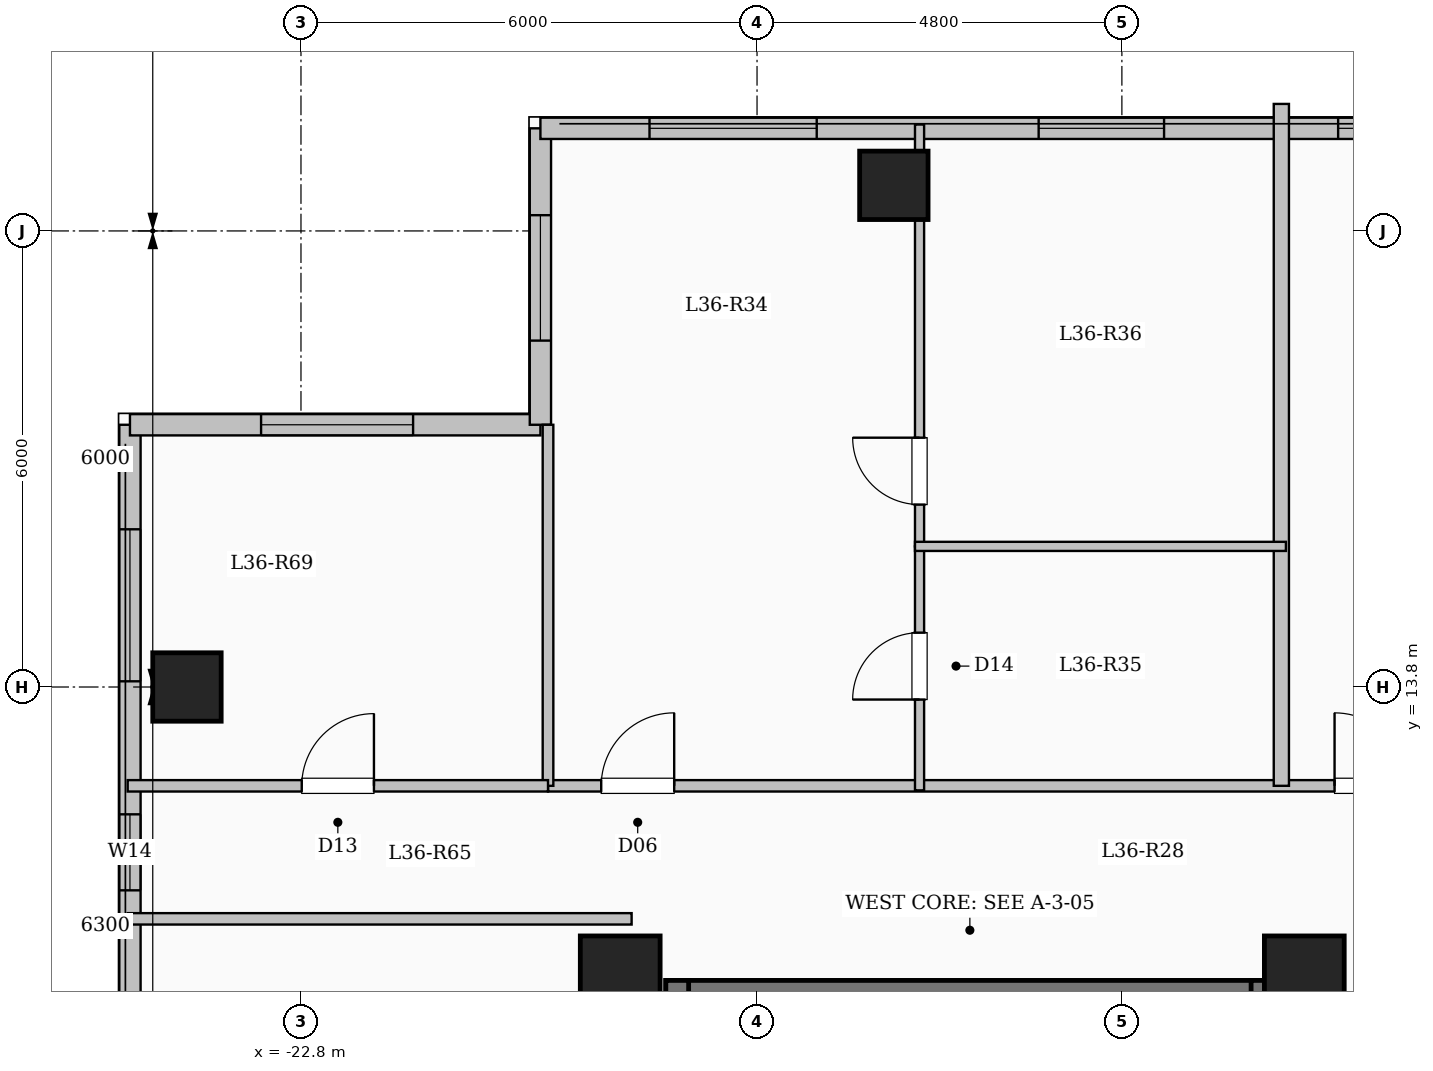
"""IFC4 building model, lengths in metres.
Left out: names, types, materials, properties, quantities, classifications, styles, units other than length and angle.
Written with IfcOpenShell. Run it as: python <this file> out.ifc"""

import sys

from ifc_helpers import new_model, si_unit, direction, frame, frame_2d, origin, origin_2d, place, context, subcontext, project, spatial, rectangle, extrude, element, fill, save


model = new_model("IFC4")
c1 = context("Model", 3, precision=1e-05, world=origin(), true_north=direction((0.0, 1.0)))
c2 = subcontext(c1, "Body", "Model", "MODEL_VIEW")
j1 = project(units=[si_unit("LENGTHUNIT", "METRE"), si_unit("PLANEANGLEUNIT", "RADIAN")], contexts=[c1])
p1 = place(None, origin())
s1 = spatial("IfcSite", under=j1, at=p1, CompositionType="ELEMENT")
p2 = place(p1, origin())
s2 = spatial("IfcBuilding", under=s1, at=p2, CompositionType="ELEMENT")
p3 = place(p2, frame((0.0, 0.0, 135.95)))
s3 = spatial("IfcBuildingStorey", under=s2, at=p3, CompositionType="ELEMENT", Elevation=135.95)
for number, where, z_axis, x_axis in (
    (1, (-9.6, 10.0, 0.0), (0.0, 0.0, 1.0), (1.0, 0.0, 0.0)),
    (2, (-18.6, 10.0, 0.0), (0.0, 0.0, 1.0), (1.0, 0.0, 0.0)),
):
    element("IfcColumn", number, at=place(p3, frame(where, z_axis=z_axis, x_axis=x_axis)), inside=s3, PredefinedType="COLUMN", context=c2, shape_type="SweptSolid", body=[
        extrude(rectangle(XDim=1.05, YDim=1.05, at=origin_2d()), origin(), (0.0, 0.0, 1.0), 3.35),
    ])
for number, where, z_axis, x_axis in (
    (3, (-15.0, 20.4, 0.0), (0.0, 0.0, 1.0), (1.0, 0.0, 0.0)),
    (4, (-24.3, 13.8, 0.0), (0.0, 0.0, 1.0), (1.0, 0.0, 0.0)),
):
    element("IfcColumn", number, at=place(p3, frame(where, z_axis=z_axis, x_axis=x_axis)), inside=s3, PredefinedType="COLUMN", context=c2, shape_type="SweptSolid", body=[
        extrude(rectangle(XDim=0.9, YDim=0.9, at=origin_2d()), origin(), (0.0, 0.0, 1.0), 3.35),
    ])
p4 = place(p3, frame((-25.05, -17.25, 0.0), z_axis=(0.0, 0.0, 1.0), x_axis=(0.0, 1.0, 0.0)))
e5 = element("IfcWall", 5, at=p4, inside=s3, PredefinedType="SOLIDWALL", context=c2, shape_type="SweptSolid", body=[
    extrude(rectangle(XDim=34.5, YDim=0.28, at=frame_2d((17.25, 0.0))), origin(), (0.0, 0.0, 1.0), 3.1),
])
p5 = place(p4, frame((2.35, 0.0, 0.9)))
e6 = element("IfcOpeningElement", 6, at=p5, cuts=e5, PredefinedType="OPENING", context=c2, shape_type="SweptSolid", body=[
    extrude(rectangle(XDim=2.2, YDim=1.75, at=frame_2d((1.1, 0.875))), frame((0.0, 0.15, 0.0), z_axis=(0.0, -1.0, 0.0), x_axis=(1.0, 0.0, 0.0)), (0.0, 0.0, 1.0), 0.3),
])
p6 = place(p4, frame((7.742, 0.0, 0.9)))
e7 = element("IfcOpeningElement", 7, at=p6, cuts=e5, PredefinedType="OPENING", context=c2, shape_type="SweptSolid", body=[
    extrude(rectangle(XDim=1.5, YDim=1.65, at=frame_2d((0.75, 0.825))), frame((0.0, 0.15, 0.0), z_axis=(0.0, -1.0, 0.0), x_axis=(1.0, 0.0, 0.0)), (0.0, 0.0, 1.0), 0.3),
])
p7 = place(p4, frame((13.25, 0.0, 0.9)))
e8 = element("IfcOpeningElement", 8, at=p7, cuts=e5, PredefinedType="OPENING", context=c2, shape_type="SweptSolid", body=[
    extrude(rectangle(XDim=2.2, YDim=1.75, at=frame_2d((1.1, 0.875))), frame((0.0, 0.15, 0.0), z_axis=(0.0, -1.0, 0.0), x_axis=(1.0, 0.0, 0.0)), (0.0, 0.0, 1.0), 0.3),
])
p8 = place(p4, frame((19.65, 0.0, 0.9)))
e9 = element("IfcOpeningElement", 9, at=p8, cuts=e5, PredefinedType="OPENING", context=c2, shape_type="SweptSolid", body=[
    extrude(rectangle(XDim=1.65, YDim=1.6, at=frame_2d((0.825, 0.8))), frame((0.0, 0.15, 0.0), z_axis=(0.0, -1.0, 0.0), x_axis=(1.0, 0.0, 0.0)), (0.0, 0.0, 1.0), 0.3),
])
p9 = place(p4, frame((24.125, 0.0, 0.9)))
e10 = element("IfcOpeningElement", 10, at=p9, cuts=e5, PredefinedType="OPENING", context=c2, shape_type="SweptSolid", body=[
    extrude(rectangle(XDim=2.0, YDim=1.7, at=frame_2d((1.0, 0.85))), frame((0.0, 0.15, 0.0), z_axis=(0.0, -1.0, 0.0), x_axis=(1.0, 0.0, 0.0)), (0.0, 0.0, 1.0), 0.3),
])
p10 = place(p4, frame((28.375, 0.0, 0.95)))
e11 = element("IfcOpeningElement", 11, at=p10, cuts=e5, PredefinedType="OPENING", context=c2, shape_type="SweptSolid", body=[
    extrude(rectangle(XDim=1.0, YDim=1.5, at=frame_2d((0.5, 0.75))), frame((0.0, 0.15, 0.0), z_axis=(0.0, -1.0, 0.0), x_axis=(1.0, 0.0, 0.0)), (0.0, 0.0, 1.0), 0.3),
])
p11 = place(p4, frame((31.125, 0.0, 0.9)))
e12 = element("IfcOpeningElement", 12, at=p11, cuts=e5, PredefinedType="OPENING", context=c2, shape_type="SweptSolid", body=[
    extrude(rectangle(XDim=2.0, YDim=1.7, at=frame_2d((1.0, 0.85))), frame((0.0, 0.15, 0.0), z_axis=(0.0, -1.0, 0.0), x_axis=(1.0, 0.0, 0.0)), (0.0, 0.0, 1.0), 0.3),
])
p12 = place(p3, frame((-25.05, 17.25, 0.0), z_axis=(0.0, 0.0, 1.0), x_axis=(1.0, 0.0, 0.0)))
e13 = element("IfcWall", 13, at=p12, inside=s3, PredefinedType="SOLIDWALL", context=c2, shape_type="SweptSolid", body=[
    extrude(rectangle(XDim=5.4, YDim=0.28, at=frame_2d((2.7, 0.0))), origin(), (0.0, 0.0, 1.0), 3.1),
])
p13 = place(p12, frame((1.725, 0.0, 0.9)))
e14 = element("IfcOpeningElement", 14, at=p13, cuts=e13, PredefinedType="OPENING", context=c2, shape_type="SweptSolid", body=[
    extrude(rectangle(XDim=2.0, YDim=1.7, at=frame_2d((1.0, 0.85))), frame((0.0, 0.15, 0.0), z_axis=(0.0, -1.0, 0.0), x_axis=(1.0, 0.0, 0.0)), (0.0, 0.0, 1.0), 0.3),
])
p14 = place(p3, frame((-19.65, 17.25, 0.0), z_axis=(0.0, 0.0, 1.0), x_axis=(0.0, 1.0, 0.0)))
e15 = element("IfcWall", 15, at=p14, inside=s3, PredefinedType="SOLIDWALL", context=c2, shape_type="SweptSolid", body=[
    extrude(rectangle(XDim=3.9, YDim=0.28, at=frame_2d((1.95, 0.0))), origin(), (0.0, 0.0, 1.0), 3.1),
])
p15 = place(p14, frame((1.107, 0.0, 0.9)))
e16 = element("IfcOpeningElement", 16, at=p15, cuts=e15, PredefinedType="OPENING", context=c2, shape_type="SweptSolid", body=[
    extrude(rectangle(XDim=1.65, YDim=1.6, at=frame_2d((0.825, 0.8))), frame((0.0, 0.15, 0.0), z_axis=(0.0, -1.0, 0.0), x_axis=(1.0, 0.0, 0.0)), (0.0, 0.0, 1.0), 0.3),
])
p16 = place(p3, frame((-19.65, 21.15, 0.0), z_axis=(0.0, 0.0, 1.0), x_axis=(1.0, 0.0, 0.0)))
e17 = element("IfcWall", 17, at=p16, inside=s3, PredefinedType="SOLIDWALL", context=c2, shape_type="SweptSolid", body=[
    extrude(rectangle(XDim=12.3, YDim=0.28, at=frame_2d((6.15, 0.0))), origin(), (0.0, 0.0, 1.0), 3.1),
])
p17 = place(p16, frame((1.435, 0.0, 0.9)))
e18 = element("IfcOpeningElement", 18, at=p17, cuts=e17, PredefinedType="OPENING", context=c2, shape_type="SweptSolid", body=[
    extrude(rectangle(XDim=2.2, YDim=1.75, at=frame_2d((1.1, 0.875))), frame((0.0, 0.15, 0.0), z_axis=(0.0, -1.0, 0.0), x_axis=(1.0, 0.0, 0.0)), (0.0, 0.0, 1.0), 0.3),
])
p18 = place(p16, frame((6.555, 0.0, 0.9)))
e19 = element("IfcOpeningElement", 19, at=p18, cuts=e17, PredefinedType="OPENING", context=c2, shape_type="SweptSolid", body=[
    extrude(rectangle(XDim=1.65, YDim=1.6, at=frame_2d((0.825, 0.8))), frame((0.0, 0.15, 0.0), z_axis=(0.0, -1.0, 0.0), x_axis=(1.0, 0.0, 0.0)), (0.0, 0.0, 1.0), 0.3),
])
p19 = place(p16, frame((10.495, 0.0, 0.95)))
e20 = element("IfcOpeningElement", 20, at=p19, cuts=e17, PredefinedType="OPENING", context=c2, shape_type="SweptSolid", body=[
    extrude(rectangle(XDim=1.2, YDim=1.5, at=frame_2d((0.6, 0.75))), frame((0.0, 0.15, 0.0), z_axis=(0.0, -1.0, 0.0), x_axis=(1.0, 0.0, 0.0)), (0.0, 0.0, 1.0), 0.3),
])
p20 = place(p3, frame((-18.0, 9.79, 0.0), z_axis=(0.0, 0.0, 1.0), x_axis=(1.0, 0.0, 0.0)))
e21 = element("IfcWall", 21, at=p20, inside=s3, PredefinedType="SHEAR", context=c2, shape_type="SweptSolid", body=[
    extrude(rectangle(XDim=8.0, YDim=0.3, at=frame_2d((4.0, 0.0))), origin(), (0.0, 0.0, 1.0), 3.35),
])
for number, where, z_axis, x_axis in (
    (22, (-17.85, 6.35, 0.0), (0.0, 0.0, 1.0), (0.0, 1.0, 0.0)),
    (23, (-10.15, 6.35, 0.0), (0.0, 0.0, 1.0), (0.0, 1.0, 0.0)),
):
    element("IfcWall", number, at=place(p3, frame(where, z_axis=z_axis, x_axis=x_axis)), inside=s3, PredefinedType="SHEAR", context=c2, shape_type="SweptSolid", body=[
        extrude(rectangle(XDim=3.59, YDim=0.3, at=frame_2d((1.795, 0.0))), origin(), (0.0, 0.0, 1.0), 3.35),
    ])
p21 = place(p3, frame((-19.55, 12.5, 0.0), z_axis=(0.0, 0.0, 1.0), x_axis=(1.0, 0.0, 0.0)))
e24 = element("IfcWall", 24, at=p21, inside=s3, PredefinedType="PARTITIONING", context=c2, shape_type="SweptSolid", body=[
    extrude(rectangle(XDim=15.7, YDim=0.15, at=frame_2d((7.85, 0.0))), origin(), (0.0, 0.0, 1.0), 3.1),
])
p22 = place(p21, frame((0.7, 0.0, 0.0)))
e25 = element("IfcOpeningElement", 25, at=p22, cuts=e24, PredefinedType="OPENING", context=c2, shape_type="SweptSolid", body=[
    extrude(rectangle(XDim=0.96, YDim=2.15, at=frame_2d((0.48, 1.075))), frame((0.0, 0.085, 0.0), z_axis=(0.0, -1.0, 0.0), x_axis=(1.0, 0.0, 0.0)), (0.0, 0.0, 1.0), 0.17),
])
p23 = place(p21, frame((10.348, 0.0, 0.0)))
e26 = element("IfcOpeningElement", 26, at=p23, cuts=e24, PredefinedType="OPENING", context=c2, shape_type="SweptSolid", body=[
    extrude(rectangle(XDim=0.96, YDim=2.15, at=frame_2d((0.48, 1.075))), frame((0.0, 0.085, 0.0), z_axis=(0.0, -1.0, 0.0), x_axis=(1.0, 0.0, 0.0)), (0.0, 0.0, 1.0), 0.17),
])
p24 = place(p3, frame((-9.902, 12.5, 0.0), z_axis=(0.0, 0.0, 1.0), x_axis=(0.0, 1.0, 0.0)))
e27 = element("IfcWall", 27, at=p24, inside=s3, PredefinedType="SOLIDWALL", context=c2, shape_type="SweptSolid", body=[
    extrude(rectangle(XDim=8.971, YDim=0.2, at=frame_2d((4.485, 0.0))), origin(), (0.0, 0.0, 1.0), 3.1),
])
p25 = place(p3, frame((-14.662, 12.44, 0.0), z_axis=(0.0, 0.0, 1.0), x_axis=(0.0, 1.0, 0.0)))
e28 = element("IfcWall", 28, at=p25, inside=s3, PredefinedType="PARTITIONING", context=c2, shape_type="SweptSolid", body=[
    extrude(rectangle(XDim=3.21, YDim=0.12, at=frame_2d((1.605, 0.0))), origin(), (0.0, 0.0, 1.0), 3.1),
])
p26 = place(p25, frame((1.195, 0.0, 0.0)))
e29 = element("IfcOpeningElement", 29, at=p26, cuts=e28, PredefinedType="OPENING", context=c2, shape_type="SweptSolid", body=[
    extrude(rectangle(XDim=0.88, YDim=2.1, at=frame_2d((0.44, 1.05))), frame((0.0, 0.07, 0.0), z_axis=(0.0, -1.0, 0.0), x_axis=(1.0, 0.0, 0.0)), (0.0, 0.0, 1.0), 0.14),
])
p27 = place(p3, frame((-14.662, 15.65, 0.0), z_axis=(0.0, 0.0, 1.0), x_axis=(0.0, 1.0, 0.0)))
e30 = element("IfcWall", 30, at=p27, inside=s3, PredefinedType="PARTITIONING", context=c2, shape_type="SweptSolid", body=[
    extrude(rectangle(XDim=5.55, YDim=0.12, at=frame_2d((2.775, 0.0))), origin(), (0.0, 0.0, 1.0), 3.1),
])
p28 = place(p27, frame((0.55, 0.0, 0.0)))
e31 = element("IfcOpeningElement", 31, at=p28, cuts=e30, PredefinedType="OPENING", context=c2, shape_type="SweptSolid", body=[
    extrude(rectangle(XDim=0.88, YDim=2.1, at=frame_2d((0.44, 1.05))), frame((0.0, 0.07, 0.0), z_axis=(0.0, -1.0, 0.0), x_axis=(1.0, 0.0, 0.0)), (0.0, 0.0, 1.0), 0.14),
])
p29 = place(p3, frame((-14.722, 15.65, 0.0), z_axis=(0.0, 0.0, 1.0), x_axis=(1.0, 0.0, 0.0)))
e32 = element("IfcWall", 32, at=p29, inside=s3, PredefinedType="PARTITIONING", context=c2, shape_type="SweptSolid", body=[
    extrude(rectangle(XDim=4.88, YDim=0.12, at=frame_2d((2.44, 0.0))), origin(), (0.0, 0.0, 1.0), 2.685),
])
p30 = place(p3, frame((-25.08, 10.75, 0.0), z_axis=(0.0, 0.0, 1.0), x_axis=(1.0, 0.0, 0.0)))
e33 = element("IfcWall", 33, at=p30, inside=s3, PredefinedType="PARTITIONING", context=c2, shape_type="SweptSolid", body=[
    extrude(rectangle(XDim=6.63, YDim=0.15, at=frame_2d((3.315, 0.0))), origin(), (0.0, 0.0, 1.0), 3.1),
])
p31 = place(p3, frame((-19.55, 12.5, 0.0), z_axis=(0.0, 0.0, 1.0), x_axis=(0.0, 1.0, 0.0)))
e34 = element("IfcWall", 34, at=p31, inside=s3, PredefinedType="PARTITIONING", context=c2, shape_type="SweptSolid", body=[
    extrude(rectangle(XDim=4.75, YDim=0.14, at=frame_2d((2.375, 0.0))), origin(), (0.0, 0.0, 1.0), 3.1),
])
p32 = place(p3, frame((-25.08, 12.5, 0.0), z_axis=(0.0, 0.0, 1.0), x_axis=(1.0, 0.0, 0.0)))
e35 = element("IfcWall", 35, at=p32, inside=s3, PredefinedType="PARTITIONING", context=c2, shape_type="SweptSolid", body=[
    extrude(rectangle(XDim=5.53, YDim=0.15, at=frame_2d((2.765, 0.0))), origin(), (0.0, 0.0, 1.0), 3.1),
])
p33 = place(p32, frame((2.29, 0.0, 0.0)))
e36 = element("IfcOpeningElement", 36, at=p33, cuts=e35, PredefinedType="OPENING", context=c2, shape_type="SweptSolid", body=[
    extrude(rectangle(XDim=0.95, YDim=2.15, at=frame_2d((0.475, 1.075))), frame((0.0, 0.085, 0.0), z_axis=(0.0, -1.0, 0.0), x_axis=(1.0, 0.0, 0.0)), (0.0, 0.0, 1.0), 0.17),
])
p34 = place(p10, origin())
e37 = element("IfcWindow", 37, at=p34, inside=s3, PartitioningType="SINGLE_PANEL", PredefinedType="WINDOW", context=c2, shape_type="SweptSolid", body=[
    extrude(rectangle(XDim=1.0, YDim=1.5, at=frame_2d((0.5, 0.75))), frame((0.0, 0.03, 0.0), z_axis=(0.0, -1.0, 0.0), x_axis=(1.0, 0.0, 0.0)), (0.0, 0.0, 1.0), 0.06),
])
fill(e11, e37)
p35 = place(p11, origin())
e38 = element("IfcWindow", 38, at=p35, inside=s3, PartitioningType="SINGLE_PANEL", PredefinedType="WINDOW", context=c2, shape_type="SweptSolid", body=[
    extrude(rectangle(XDim=2.0, YDim=1.7, at=frame_2d((1.0, 0.85))), frame((0.0, 0.03, 0.0), z_axis=(0.0, -1.0, 0.0), x_axis=(1.0, 0.0, 0.0)), (0.0, 0.0, 1.0), 0.06),
])
fill(e12, e38)
p36 = place(p13, origin())
e39 = element("IfcWindow", 39, at=p36, inside=s3, PartitioningType="SINGLE_PANEL", PredefinedType="WINDOW", context=c2, shape_type="SweptSolid", body=[
    extrude(rectangle(XDim=2.0, YDim=1.7, at=frame_2d((1.0, 0.85))), frame((0.0, 0.03, 0.0), z_axis=(0.0, -1.0, 0.0), x_axis=(1.0, 0.0, 0.0)), (0.0, 0.0, 1.0), 0.06),
])
fill(e14, e39)
p37 = place(p15, origin())
e40 = element("IfcWindow", 40, at=p37, inside=s3, PartitioningType="SINGLE_PANEL", PredefinedType="WINDOW", context=c2, shape_type="SweptSolid", body=[
    extrude(rectangle(XDim=1.65, YDim=1.6, at=frame_2d((0.825, 0.8))), frame((0.0, 0.03, 0.0), z_axis=(0.0, -1.0, 0.0), x_axis=(1.0, 0.0, 0.0)), (0.0, 0.0, 1.0), 0.06),
])
fill(e16, e40)
p38 = place(p17, origin())
e41 = element("IfcWindow", 41, at=p38, inside=s3, PartitioningType="SINGLE_PANEL", PredefinedType="WINDOW", context=c2, shape_type="SweptSolid", body=[
    extrude(rectangle(XDim=2.2, YDim=1.75, at=frame_2d((1.1, 0.875))), frame((0.0, 0.03, 0.0), z_axis=(0.0, -1.0, 0.0), x_axis=(1.0, 0.0, 0.0)), (0.0, 0.0, 1.0), 0.06),
])
fill(e18, e41)
p39 = place(p18, origin())
e42 = element("IfcWindow", 42, at=p39, inside=s3, PartitioningType="SINGLE_PANEL", PredefinedType="WINDOW", context=c2, shape_type="SweptSolid", body=[
    extrude(rectangle(XDim=1.65, YDim=1.6, at=frame_2d((0.825, 0.8))), frame((0.0, 0.03, 0.0), z_axis=(0.0, -1.0, 0.0), x_axis=(1.0, 0.0, 0.0)), (0.0, 0.0, 1.0), 0.06),
])
fill(e19, e42)
p40 = place(p19, origin())
e43 = element("IfcWindow", 43, at=p40, inside=s3, PartitioningType="SINGLE_PANEL", PredefinedType="WINDOW", context=c2, shape_type="SweptSolid", body=[
    extrude(rectangle(XDim=1.2, YDim=1.5, at=frame_2d((0.6, 0.75))), frame((0.0, 0.03, 0.0), z_axis=(0.0, -1.0, 0.0), x_axis=(1.0, 0.0, 0.0)), (0.0, 0.0, 1.0), 0.06),
])
fill(e20, e43)
p41 = place(p22, origin())
e44 = element("IfcDoor", 44, at=p41, inside=s3, OperationType="SINGLE_SWING_RIGHT", PredefinedType="DOOR", context=c2, shape_type="SweptSolid", body=[
    extrude(rectangle(XDim=0.96, YDim=2.15, at=frame_2d((0.48, 1.075))), frame((0.0, 0.025, 0.0), z_axis=(0.0, -1.0, 0.0), x_axis=(1.0, 0.0, 0.0)), (0.0, 0.0, 1.0), 0.05),
])
fill(e25, e44)
p42 = place(p26, origin())
e45 = element("IfcDoor", 45, at=p42, inside=s3, OperationType="SINGLE_SWING_LEFT", PredefinedType="DOOR", context=c2, shape_type="SweptSolid", body=[
    extrude(rectangle(XDim=0.88, YDim=2.1, at=frame_2d((0.44, 1.05))), frame((0.0, 0.025, 0.0), z_axis=(0.0, -1.0, 0.0), x_axis=(1.0, 0.0, 0.0)), (0.0, 0.0, 1.0), 0.05),
])
fill(e29, e45)
p43 = place(p28, origin())
e46 = element("IfcDoor", 46, at=p43, inside=s3, OperationType="SINGLE_SWING_RIGHT", PredefinedType="DOOR", context=c2, shape_type="SweptSolid", body=[
    extrude(rectangle(XDim=0.88, YDim=2.1, at=frame_2d((0.44, 1.05))), frame((0.0, 0.025, 0.0), z_axis=(0.0, -1.0, 0.0), x_axis=(1.0, 0.0, 0.0)), (0.0, 0.0, 1.0), 0.05),
])
fill(e31, e46)
p44 = place(p23, origin())
e47 = element("IfcDoor", 47, at=p44, inside=s3, OperationType="SINGLE_SWING_LEFT", PredefinedType="DOOR", context=c2, shape_type="SweptSolid", body=[
    extrude(rectangle(XDim=0.96, YDim=2.15, at=frame_2d((0.48, 1.075))), frame((0.0, 0.025, 0.0), z_axis=(0.0, -1.0, 0.0), x_axis=(1.0, 0.0, 0.0)), (0.0, 0.0, 1.0), 0.05),
])
fill(e26, e47)
p45 = place(p33, origin())
e48 = element("IfcDoor", 48, at=p45, inside=s3, OperationType="SINGLE_SWING_RIGHT", PredefinedType="DOOR", context=c2, shape_type="SweptSolid", body=[
    extrude(rectangle(XDim=0.95, YDim=2.15, at=frame_2d((0.475, 1.075))), frame((0.0, 0.025, 0.0), z_axis=(0.0, -1.0, 0.0), x_axis=(1.0, 0.0, 0.0)), (0.0, 0.0, 1.0), 0.05),
])
fill(e36, e48)
save(model, sys.argv[1])
